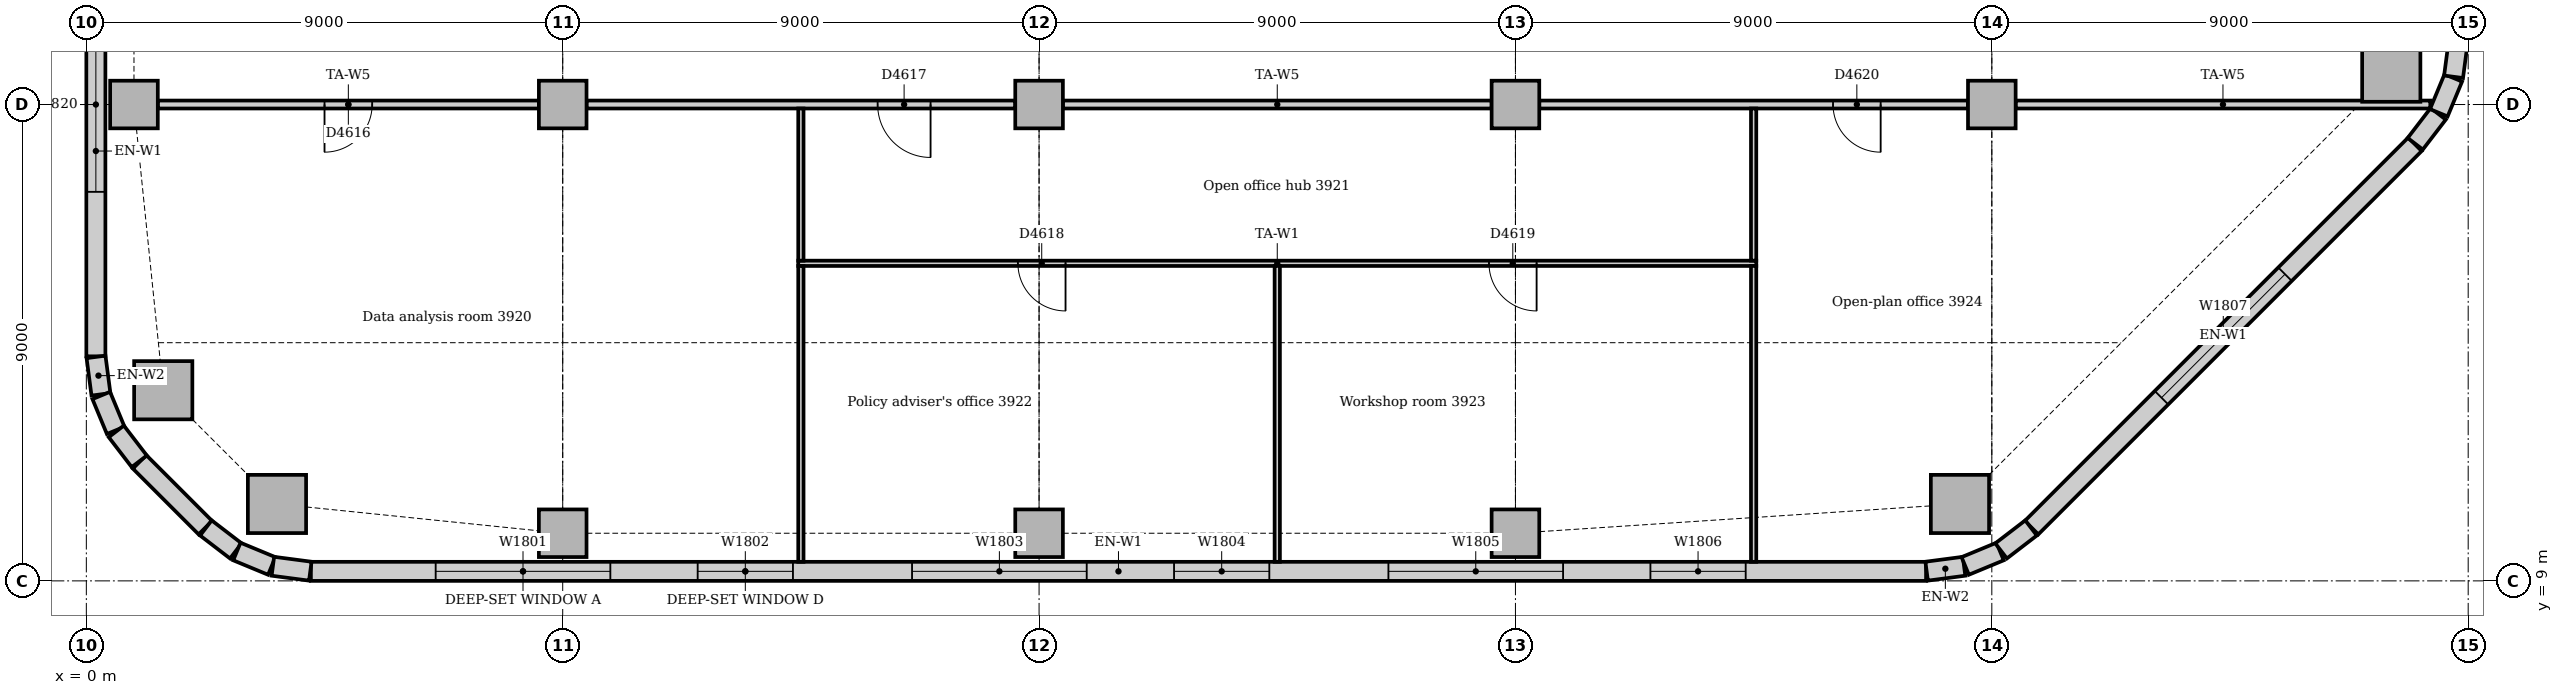
"""IFC4 building model, lengths in metres.
Left out: names, types, materials, properties, quantities, classifications, styles, units other than length and angle.
Written with IfcOpenShell. Run it as: python <this file> out.ifc"""

import sys

from ifc_helpers import new_model, si_unit, direction, frame, frame_2d, origin, origin_2d, place, context, subcontext, project, spatial, rectangle, extrude, element, fill, save


model = new_model("IFC4")
c1 = context("Model", 3, precision=1e-05, world=origin(), true_north=direction((0.0, 1.0)))
c2 = subcontext(c1, "Body", "Model", "MODEL_VIEW")
j1 = project(units=[si_unit("LENGTHUNIT", "METRE"), si_unit("PLANEANGLEUNIT", "RADIAN")], contexts=[c1])
p1 = place(None, origin())
s1 = spatial("IfcSite", under=j1, at=p1, CompositionType="ELEMENT")
p2 = place(p1, origin())
s2 = spatial("IfcBuilding", under=s1, at=p2, CompositionType="ELEMENT")
p3 = place(p2, frame((0.0, 0.0, 165.0)))
s3 = spatial("IfcBuildingStorey", under=s2, at=p3, CompositionType="ELEMENT", Elevation=165.0)
for number, where, z_axis, x_axis in (
    (1, (3.602, 10.453, 0.0), (0.0, 0.0, 1.0), (1.0, 0.0, 0.0)),
    (2, (35.398, 10.453, 0.0), (0.0, 0.0, 1.0), (1.0, 0.0, 0.0)),
    (3, (43.547, 18.602, 0.0), (0.0, 0.0, 1.0), (1.0, 0.0, 0.0)),
    (4, (1.453, 12.602, 0.0), (0.0, 0.0, 1.0), (1.0, 0.0, 0.0)),
):
    element("IfcColumn", number, at=place(p3, frame(where, z_axis=z_axis, x_axis=x_axis)), inside=s3, PredefinedType="COLUMN", context=c2, shape_type="SweptSolid", body=[
        extrude(rectangle(XDim=1.1, YDim=1.1, at=origin_2d()), origin(), (0.0, 0.0, 1.0), 3.85),
    ])
for number, where, z_axis, x_axis in (
    (5, (9.0, 9.9, 0.0), (0.0, 0.0, 1.0), (1.0, 0.0, 0.0)),
    (6, (18.0, 9.9, 0.0), (0.0, 0.0, 1.0), (1.0, 0.0, 0.0)),
    (7, (27.0, 9.9, 0.0), (0.0, 0.0, 1.0), (1.0, 0.0, 0.0)),
    (8, (0.9, 18.0, 0.0), (0.0, 0.0, 1.0), (1.0, 0.0, 0.0)),
    (9, (9.0, 18.0, 0.0), (0.0, 0.0, 1.0), (1.0, 0.0, 0.0)),
    (10, (18.0, 18.0, 0.0), (0.0, 0.0, 1.0), (1.0, 0.0, 0.0)),
    (11, (27.0, 18.0, 0.0), (0.0, 0.0, 1.0), (1.0, 0.0, 0.0)),
    (12, (36.0, 18.0, 0.0), (0.0, 0.0, 1.0), (1.0, 0.0, 0.0)),
):
    element("IfcColumn", number, at=place(p3, frame(where, z_axis=z_axis, x_axis=x_axis)), inside=s3, PredefinedType="COLUMN", context=c2, shape_type="SweptSolid", body=[
        extrude(rectangle(XDim=0.9, YDim=0.9, at=origin_2d()), origin(), (0.0, 0.0, 1.0), 3.85),
    ])
p4 = place(p3, frame((4.243, 9.18, 0.0), z_axis=(0.0, 0.0, 1.0), x_axis=(1.0, 0.0, 0.0)))
e13 = element("IfcWall", 13, at=p4, inside=s3, PredefinedType="STANDARD", context=c2, shape_type="SweptSolid", body=[
    extrude(rectangle(XDim=30.515, YDim=0.36, at=frame_2d((15.257, 0.0))), origin(), (0.0, 0.0, 1.0), 3.85),
])
p5 = place(p4, frame((2.357, 0.0, 0.9)))
e14 = element("IfcOpeningElement", 14, at=p5, cuts=e13, PredefinedType="OPENING", context=c2, shape_type="SweptSolid", body=[
    extrude(rectangle(XDim=3.3, YDim=1.6, at=frame_2d((1.65, 0.8))), frame((0.0, 0.19, 0.0), z_axis=(0.0, -1.0, 0.0), x_axis=(1.0, 0.0, 0.0)), (0.0, 0.0, 1.0), 0.38),
])
p6 = place(p4, frame((7.307, 0.0, 0.9)))
e15 = element("IfcOpeningElement", 15, at=p6, cuts=e13, PredefinedType="OPENING", context=c2, shape_type="SweptSolid", body=[
    extrude(rectangle(XDim=1.8, YDim=1.6, at=frame_2d((0.9, 0.8))), frame((0.0, 0.19, 0.0), z_axis=(0.0, -1.0, 0.0), x_axis=(1.0, 0.0, 0.0)), (0.0, 0.0, 1.0), 0.38),
])
p7 = place(p4, frame((11.357, 0.0, 0.9)))
e16 = element("IfcOpeningElement", 16, at=p7, cuts=e13, PredefinedType="OPENING", context=c2, shape_type="SweptSolid", body=[
    extrude(rectangle(XDim=3.3, YDim=1.6, at=frame_2d((1.65, 0.8))), frame((0.0, 0.19, 0.0), z_axis=(0.0, -1.0, 0.0), x_axis=(1.0, 0.0, 0.0)), (0.0, 0.0, 1.0), 0.38),
])
p8 = place(p4, frame((16.307, 0.0, 0.9)))
e17 = element("IfcOpeningElement", 17, at=p8, cuts=e13, PredefinedType="OPENING", context=c2, shape_type="SweptSolid", body=[
    extrude(rectangle(XDim=1.8, YDim=1.6, at=frame_2d((0.9, 0.8))), frame((0.0, 0.19, 0.0), z_axis=(0.0, -1.0, 0.0), x_axis=(1.0, 0.0, 0.0)), (0.0, 0.0, 1.0), 0.38),
])
p9 = place(p4, frame((20.357, 0.0, 0.9)))
e18 = element("IfcOpeningElement", 18, at=p9, cuts=e13, PredefinedType="OPENING", context=c2, shape_type="SweptSolid", body=[
    extrude(rectangle(XDim=3.3, YDim=1.6, at=frame_2d((1.65, 0.8))), frame((0.0, 0.19, 0.0), z_axis=(0.0, -1.0, 0.0), x_axis=(1.0, 0.0, 0.0)), (0.0, 0.0, 1.0), 0.38),
])
p10 = place(p4, frame((25.307, 0.0, 0.9)))
e19 = element("IfcOpeningElement", 19, at=p10, cuts=e13, PredefinedType="OPENING", context=c2, shape_type="SweptSolid", body=[
    extrude(rectangle(XDim=1.8, YDim=1.6, at=frame_2d((0.9, 0.8))), frame((0.0, 0.19, 0.0), z_axis=(0.0, -1.0, 0.0), x_axis=(1.0, 0.0, 0.0)), (0.0, 0.0, 1.0), 0.38),
])
p11 = place(p3, frame((36.751, 10.006, 0.0), z_axis=(0.0, 0.0, 1.0), x_axis=(0.707106781187, 0.707106781187, 0.0)))
e20 = element("IfcWall", 20, at=p11, inside=s3, PredefinedType="STANDARD", context=c2, shape_type="SweptSolid", body=[
    extrude(rectangle(XDim=10.243, YDim=0.36, at=frame_2d((5.121, 0.0))), origin(), (0.0, 0.0, 1.0), 3.85),
])
p12 = place(p11, frame((3.471, 0.0, 0.9)))
e21 = element("IfcOpeningElement", 21, at=p12, cuts=e20, PredefinedType="OPENING", context=c2, shape_type="SweptSolid", body=[
    extrude(rectangle(XDim=3.3, YDim=1.6, at=frame_2d((1.65, 0.8))), frame((0.0, 0.19, 0.0), z_axis=(0.0, -1.0, 0.0), x_axis=(1.0, 0.0, 0.0)), (0.0, 0.0, 1.0), 0.38),
])
p13 = place(p3, frame((0.18, 21.0, 0.0), z_axis=(0.0, 0.0, 1.0), x_axis=(0.0, -1.0, 0.0)))
e22 = element("IfcWall", 22, at=p13, inside=s3, PredefinedType="STANDARD", context=c2, shape_type="SweptSolid", body=[
    extrude(rectangle(XDim=7.757, YDim=0.36, at=frame_2d((3.879, 0.0))), origin(), (0.0, 0.0, 1.0), 3.85),
])
p14 = place(p13, frame((1.35, 0.0, 0.9)))
e23 = element("IfcOpeningElement", 23, at=p14, cuts=e22, PredefinedType="OPENING", context=c2, shape_type="SweptSolid", body=[
    extrude(rectangle(XDim=3.3, YDim=1.6, at=frame_2d((1.65, 0.8))), frame((0.0, 0.19, 0.0), z_axis=(0.0, -1.0, 0.0), x_axis=(1.0, 0.0, 0.0)), (0.0, 0.0, 1.0), 0.38),
])
p15 = place(p3, frame((1.006, 11.249, 0.0), z_axis=(0.0, 0.0, 1.0), x_axis=(0.707106781187, -0.707106781187, 0.0)))
e24 = element("IfcWall", 24, at=p15, inside=s3, PredefinedType="STANDARD", context=c2, shape_type="SweptSolid", body=[
    extrude(rectangle(XDim=1.757, YDim=0.36, at=frame_2d((0.879, 0.0))), origin(), (0.0, 0.0, 1.0), 3.85),
])
for number, where, z_axis, x_axis in (
    (25, (34.769, 9.183, 0.0), (0.0, 0.0, 1.0), (0.991, 0.131, 0.0)),
    (26, (35.497, 9.282, 0.0), (0.0, 0.0, 1.0), (0.924, 0.383, 0.0)),
):
    element("IfcWall", number, at=place(p3, frame(where, z_axis=z_axis, x_axis=x_axis)), inside=s3, PredefinedType="STANDARD", context=c2, shape_type="SweptSolid", body=[
        extrude(rectangle(XDim=0.713, YDim=0.36, at=frame_2d((0.356, 0.0))), origin(), (0.0, 0.0, 1.0), 3.85),
    ])
for number, where, z_axis, x_axis in (
    (27, (36.175, 9.566, 0.0), (0.0, 0.0, 1.0), (0.793, 0.609, 0.0)),
    (28, (44.0, 17.259, 0.0), (0.0, 0.0, 1.0), (0.609, 0.793, 0.0)),
):
    element("IfcWall", number, at=place(p3, frame(where, z_axis=z_axis, x_axis=x_axis)), inside=s3, PredefinedType="STANDARD", context=c2, shape_type="SweptSolid", body=[
        extrude(rectangle(XDim=0.713, YDim=0.36, at=frame_2d((0.357, 0.0))), origin(), (0.0, 0.0, 1.0), 3.85),
    ])
for number, where, z_axis, x_axis in (
    (29, (44.445, 17.844, 0.0), (0.0, 0.0, 1.0), (0.383, 0.924, 0.0)),
    (30, (44.724, 18.524, 0.0), (0.0, 0.0, 1.0), (0.131, 0.991, 0.0)),
    (31, (0.183, 13.231, 0.0), (0.0, 0.0, 1.0), (0.131, -0.991, 0.0)),
    (32, (0.282, 12.503, 0.0), (0.0, 0.0, 1.0), (0.383, -0.924, 0.0)),
):
    element("IfcWall", number, at=place(p3, frame(where, z_axis=z_axis, x_axis=x_axis)), inside=s3, PredefinedType="STANDARD", context=c2, shape_type="SweptSolid", body=[
        extrude(rectangle(XDim=0.713, YDim=0.36, at=frame_2d((0.356, 0.0))), origin(), (0.0, 0.0, 1.0), 3.85),
    ])
for number, where, z_axis, x_axis in (
    (33, (0.566, 11.825, 0.0), (0.0, 0.0, 1.0), (0.609, -0.793, 0.0)),
    (34, (2.259, 10.0, 0.0), (0.0, 0.0, 1.0), (0.793, -0.609, 0.0)),
):
    element("IfcWall", number, at=place(p3, frame(where, z_axis=z_axis, x_axis=x_axis)), inside=s3, PredefinedType="STANDARD", context=c2, shape_type="SweptSolid", body=[
        extrude(rectangle(XDim=0.713, YDim=0.36, at=frame_2d((0.357, 0.0))), origin(), (0.0, 0.0, 1.0), 3.85),
    ])
for number, where, z_axis, x_axis in (
    (35, (2.844, 9.555, 0.0), (0.0, 0.0, 1.0), (0.924, -0.383, 0.0)),
    (36, (3.524, 9.276, 0.0), (0.0, 0.0, 1.0), (0.991, -0.131, 0.0)),
):
    element("IfcWall", number, at=place(p3, frame(where, z_axis=z_axis, x_axis=x_axis)), inside=s3, PredefinedType="STANDARD", context=c2, shape_type="SweptSolid", body=[
        extrude(rectangle(XDim=0.713, YDim=0.36, at=frame_2d((0.356, 0.0))), origin(), (0.0, 0.0, 1.0), 3.85),
    ])
p16 = place(p3, frame((1.35, 18.0, 0.0), z_axis=(0.0, 0.0, 1.0), x_axis=(1.0, 0.0, 0.0)))
e37 = element("IfcWall", 37, at=p16, inside=s3, PredefinedType="PARTITIONING", context=c2, shape_type="SweptSolid", body=[
    extrude(rectangle(XDim=7.2, YDim=0.15, at=frame_2d((3.6, 0.0))), origin(), (0.0, 0.0, 1.0), 3.262),
])
p17 = place(p16, frame((3.15, 0.0, 0.0)))
e38 = element("IfcOpeningElement", 38, at=p17, cuts=e37, PredefinedType="OPENING", context=c2, shape_type="SweptSolid", body=[
    extrude(rectangle(XDim=0.9, YDim=2.1, at=frame_2d((0.45, 1.05))), frame((0.0, 0.085, 0.0), z_axis=(0.0, -1.0, 0.0), x_axis=(1.0, 0.0, 0.0)), (0.0, 0.0, 1.0), 0.17),
])
p18 = place(p3, frame((9.45, 18.0, 0.0), z_axis=(0.0, 0.0, 1.0), x_axis=(1.0, 0.0, 0.0)))
e39 = element("IfcWall", 39, at=p18, inside=s3, PredefinedType="PARTITIONING", context=c2, shape_type="SweptSolid", body=[
    extrude(rectangle(XDim=8.1, YDim=0.15, at=frame_2d((4.05, 0.0))), origin(), (0.0, 0.0, 1.0), 3.262),
])
p19 = place(p18, frame((5.5, 0.0, 0.0)))
e40 = element("IfcOpeningElement", 40, at=p19, cuts=e39, PredefinedType="OPENING", context=c2, shape_type="SweptSolid", body=[
    extrude(rectangle(XDim=1.0, YDim=2.1, at=frame_2d((0.5, 1.05))), frame((0.0, 0.085, 0.0), z_axis=(0.0, -1.0, 0.0), x_axis=(1.0, 0.0, 0.0)), (0.0, 0.0, 1.0), 0.17),
])
p20 = place(p3, frame((18.45, 18.0, 0.0), z_axis=(0.0, 0.0, 1.0), x_axis=(1.0, 0.0, 0.0)))
e41 = element("IfcWall", 41, at=p20, inside=s3, PredefinedType="PARTITIONING", context=c2, shape_type="SweptSolid", body=[
    extrude(rectangle(XDim=8.1, YDim=0.15, at=frame_2d((4.05, 0.0))), origin(), (0.0, 0.0, 1.0), 3.262),
])
p21 = place(p3, frame((27.45, 18.0, 0.0), z_axis=(0.0, 0.0, 1.0), x_axis=(1.0, 0.0, 0.0)))
e42 = element("IfcWall", 42, at=p21, inside=s3, PredefinedType="PARTITIONING", context=c2, shape_type="SweptSolid", body=[
    extrude(rectangle(XDim=8.1, YDim=0.15, at=frame_2d((4.05, 0.0))), origin(), (0.0, 0.0, 1.0), 3.262),
])
p22 = place(p21, frame((5.55, 0.0, 0.0)))
e43 = element("IfcOpeningElement", 43, at=p22, cuts=e42, PredefinedType="OPENING", context=c2, shape_type="SweptSolid", body=[
    extrude(rectangle(XDim=0.9, YDim=2.1, at=frame_2d((0.45, 1.05))), frame((0.0, 0.085, 0.0), z_axis=(0.0, -1.0, 0.0), x_axis=(1.0, 0.0, 0.0)), (0.0, 0.0, 1.0), 0.17),
])
p23 = place(p3, frame((36.45, 18.0, 0.0), z_axis=(0.0, 0.0, 1.0), x_axis=(1.0, 0.0, 0.0)))
e44 = element("IfcWall", 44, at=p23, inside=s3, PredefinedType="PARTITIONING", context=c2, shape_type="SweptSolid", body=[
    extrude(rectangle(XDim=7.834, YDim=0.15, at=frame_2d((3.917, 0.0))), origin(), (0.0, 0.0, 1.0), 3.35),
])
p24 = place(p3, frame((13.45, 15.0, 0.0), z_axis=(0.0, 0.0, 1.0), x_axis=(1.0, 0.0, 0.0)))
e45 = element("IfcWall", 45, at=p24, inside=s3, PredefinedType="PARTITIONING", context=c2, shape_type="SweptSolid", body=[
    extrude(rectangle(XDim=18.1, YDim=0.1, at=frame_2d((9.05, 0.0))), origin(), (0.0, 0.0, 1.0), 3.85),
])
p25 = place(p24, frame((4.15, 0.0, 0.0)))
e46 = element("IfcOpeningElement", 46, at=p25, cuts=e45, PredefinedType="OPENING", context=c2, shape_type="SweptSolid", body=[
    extrude(rectangle(XDim=0.9, YDim=2.1, at=frame_2d((0.45, 1.05))), frame((0.0, 0.06, 0.0), z_axis=(0.0, -1.0, 0.0), x_axis=(1.0, 0.0, 0.0)), (0.0, 0.0, 1.0), 0.12),
])
p26 = place(p24, frame((13.05, 0.0, 0.0)))
e47 = element("IfcOpeningElement", 47, at=p26, cuts=e45, PredefinedType="OPENING", context=c2, shape_type="SweptSolid", body=[
    extrude(rectangle(XDim=0.9, YDim=2.1, at=frame_2d((0.45, 1.05))), frame((0.0, 0.06, 0.0), z_axis=(0.0, -1.0, 0.0), x_axis=(1.0, 0.0, 0.0)), (0.0, 0.0, 1.0), 0.12),
])
p27 = place(p3, frame((13.5, 15.05, 0.0), z_axis=(0.0, 0.0, 1.0), x_axis=(0.0, 1.0, 0.0)))
e48 = element("IfcWall", 48, at=p27, inside=s3, PredefinedType="PARTITIONING", context=c2, shape_type="SweptSolid", body=[
    extrude(rectangle(XDim=2.875, YDim=0.1, at=frame_2d((1.438, 0.0))), origin(), (0.0, 0.0, 1.0), 3.85),
])
p28 = place(p3, frame((13.5, 9.36, 0.0), z_axis=(0.0, 0.0, 1.0), x_axis=(0.0, 1.0, 0.0)))
e49 = element("IfcWall", 49, at=p28, inside=s3, PredefinedType="PARTITIONING", context=c2, shape_type="SweptSolid", body=[
    extrude(rectangle(XDim=5.59, YDim=0.1, at=frame_2d((2.795, 0.0))), origin(), (0.0, 0.0, 1.0), 3.85),
])
p29 = place(p3, frame((31.5, 15.05, 0.0), z_axis=(0.0, 0.0, 1.0), x_axis=(0.0, 1.0, 0.0)))
e50 = element("IfcWall", 50, at=p29, inside=s3, PredefinedType="PARTITIONING", context=c2, shape_type="SweptSolid", body=[
    extrude(rectangle(XDim=2.875, YDim=0.1, at=frame_2d((1.438, 0.0))), origin(), (0.0, 0.0, 1.0), 3.85),
])
for number, where, z_axis, x_axis in (
    (51, (31.5, 9.36, 0.0), (0.0, 0.0, 1.0), (0.0, 1.0, 0.0)),
    (52, (22.5, 9.36, 0.0), (0.0, 0.0, 1.0), (0.0, 1.0, 0.0)),
):
    element("IfcWall", number, at=place(p3, frame(where, z_axis=z_axis, x_axis=x_axis)), inside=s3, PredefinedType="PARTITIONING", context=c2, shape_type="SweptSolid", body=[
        extrude(rectangle(XDim=5.59, YDim=0.1, at=frame_2d((2.795, 0.0))), origin(), (0.0, 0.0, 1.0), 3.85),
    ])
p30 = place(p5, origin())
e53 = element("IfcWindow", 53, at=p30, inside=s3, PartitioningType="SINGLE_PANEL", PredefinedType="WINDOW", context=c2, shape_type="SweptSolid", body=[
    extrude(rectangle(XDim=3.3, YDim=1.6, at=frame_2d((1.65, 0.8))), frame((0.0, 0.13, 0.0), z_axis=(0.0, -1.0, 0.0), x_axis=(1.0, 0.0, 0.0)), (0.0, 0.0, 1.0), 0.06),
])
fill(e14, e53)
p31 = place(p6, origin())
e54 = element("IfcWindow", 54, at=p31, inside=s3, PartitioningType="SINGLE_PANEL", PredefinedType="WINDOW", context=c2, shape_type="SweptSolid", body=[
    extrude(rectangle(XDim=1.8, YDim=1.6, at=frame_2d((0.9, 0.8))), frame((0.0, 0.13, 0.0), z_axis=(0.0, -1.0, 0.0), x_axis=(1.0, 0.0, 0.0)), (0.0, 0.0, 1.0), 0.06),
])
fill(e15, e54)
p32 = place(p7, origin())
e55 = element("IfcWindow", 55, at=p32, inside=s3, PartitioningType="SINGLE_PANEL", PredefinedType="WINDOW", context=c2, shape_type="SweptSolid", body=[
    extrude(rectangle(XDim=3.3, YDim=1.6, at=frame_2d((1.65, 0.8))), frame((0.0, 0.13, 0.0), z_axis=(0.0, -1.0, 0.0), x_axis=(1.0, 0.0, 0.0)), (0.0, 0.0, 1.0), 0.06),
])
fill(e16, e55)
p33 = place(p8, origin())
e56 = element("IfcWindow", 56, at=p33, inside=s3, PartitioningType="SINGLE_PANEL", PredefinedType="WINDOW", context=c2, shape_type="SweptSolid", body=[
    extrude(rectangle(XDim=1.8, YDim=1.6, at=frame_2d((0.9, 0.8))), frame((0.0, 0.13, 0.0), z_axis=(0.0, -1.0, 0.0), x_axis=(1.0, 0.0, 0.0)), (0.0, 0.0, 1.0), 0.06),
])
fill(e17, e56)
p34 = place(p9, origin())
e57 = element("IfcWindow", 57, at=p34, inside=s3, PartitioningType="SINGLE_PANEL", PredefinedType="WINDOW", context=c2, shape_type="SweptSolid", body=[
    extrude(rectangle(XDim=3.3, YDim=1.6, at=frame_2d((1.65, 0.8))), frame((0.0, 0.13, 0.0), z_axis=(0.0, -1.0, 0.0), x_axis=(1.0, 0.0, 0.0)), (0.0, 0.0, 1.0), 0.06),
])
fill(e18, e57)
p35 = place(p10, origin())
e58 = element("IfcWindow", 58, at=p35, inside=s3, PartitioningType="SINGLE_PANEL", PredefinedType="WINDOW", context=c2, shape_type="SweptSolid", body=[
    extrude(rectangle(XDim=1.8, YDim=1.6, at=frame_2d((0.9, 0.8))), frame((0.0, 0.13, 0.0), z_axis=(0.0, -1.0, 0.0), x_axis=(1.0, 0.0, 0.0)), (0.0, 0.0, 1.0), 0.06),
])
fill(e19, e58)
p36 = place(p12, origin())
e59 = element("IfcWindow", 59, at=p36, inside=s3, PartitioningType="SINGLE_PANEL", PredefinedType="WINDOW", context=c2, shape_type="SweptSolid", body=[
    extrude(rectangle(XDim=3.3, YDim=1.6, at=frame_2d((1.65, 0.8))), frame((0.0, 0.13, 0.0), z_axis=(0.0, -1.0, 0.0), x_axis=(1.0, 0.0, 0.0)), (0.0, 0.0, 1.0), 0.06),
])
fill(e21, e59)
p37 = place(p14, origin())
e60 = element("IfcWindow", 60, at=p37, inside=s3, PartitioningType="SINGLE_PANEL", PredefinedType="WINDOW", context=c2, shape_type="SweptSolid", body=[
    extrude(rectangle(XDim=3.3, YDim=1.6, at=frame_2d((1.65, 0.8))), frame((0.0, 0.13, 0.0), z_axis=(0.0, -1.0, 0.0), x_axis=(1.0, 0.0, 0.0)), (0.0, 0.0, 1.0), 0.06),
])
fill(e23, e60)
p38 = place(p17, frame((0.9, 0.0, 0.0), z_axis=(0.0, 0.0, 1.0), x_axis=(-1.0, 0.0, 0.0)))
e61 = element("IfcDoor", 61, at=p38, inside=s3, OperationType="SINGLE_SWING_RIGHT", PredefinedType="DOOR", context=c2, shape_type="SweptSolid", body=[
    extrude(rectangle(XDim=0.9, YDim=2.1, at=frame_2d((0.45, 1.05))), frame((0.0, 0.025, 0.0), z_axis=(0.0, -1.0, 0.0), x_axis=(1.0, 0.0, 0.0)), (0.0, 0.0, 1.0), 0.05),
])
fill(e38, e61)
p39 = place(p19, frame((1.0, 0.0, 0.0), z_axis=(0.0, 0.0, 1.0), x_axis=(-1.0, 0.0, 0.0)))
e62 = element("IfcDoor", 62, at=p39, inside=s3, OperationType="SINGLE_SWING_LEFT", PredefinedType="DOOR", context=c2, shape_type="SweptSolid", body=[
    extrude(rectangle(XDim=1.0, YDim=2.1, at=frame_2d((0.5, 1.05))), frame((0.0, 0.025, 0.0), z_axis=(0.0, -1.0, 0.0), x_axis=(1.0, 0.0, 0.0)), (0.0, 0.0, 1.0), 0.05),
])
fill(e40, e62)
p40 = place(p25, frame((0.9, 0.0, 0.0), z_axis=(0.0, 0.0, 1.0), x_axis=(-1.0, 0.0, 0.0)))
e63 = element("IfcDoor", 63, at=p40, inside=s3, OperationType="SINGLE_SWING_LEFT", PredefinedType="DOOR", context=c2, shape_type="SweptSolid", body=[
    extrude(rectangle(XDim=0.9, YDim=2.1, at=frame_2d((0.45, 1.05))), frame((0.0, 0.025, 0.0), z_axis=(0.0, -1.0, 0.0), x_axis=(1.0, 0.0, 0.0)), (0.0, 0.0, 1.0), 0.05),
])
fill(e46, e63)
p41 = place(p26, frame((0.9, 0.0, 0.0), z_axis=(0.0, 0.0, 1.0), x_axis=(-1.0, 0.0, 0.0)))
e64 = element("IfcDoor", 64, at=p41, inside=s3, OperationType="SINGLE_SWING_LEFT", PredefinedType="DOOR", context=c2, shape_type="SweptSolid", body=[
    extrude(rectangle(XDim=0.9, YDim=2.1, at=frame_2d((0.45, 1.05))), frame((0.0, 0.025, 0.0), z_axis=(0.0, -1.0, 0.0), x_axis=(1.0, 0.0, 0.0)), (0.0, 0.0, 1.0), 0.05),
])
fill(e47, e64)
p42 = place(p22, frame((0.9, 0.0, 0.0), z_axis=(0.0, 0.0, 1.0), x_axis=(-1.0, 0.0, 0.0)))
e65 = element("IfcDoor", 65, at=p42, inside=s3, OperationType="SINGLE_SWING_LEFT", PredefinedType="DOOR", context=c2, shape_type="SweptSolid", body=[
    extrude(rectangle(XDim=0.9, YDim=2.1, at=frame_2d((0.45, 1.05))), frame((0.0, 0.025, 0.0), z_axis=(0.0, -1.0, 0.0), x_axis=(1.0, 0.0, 0.0)), (0.0, 0.0, 1.0), 0.05),
])
fill(e43, e65)
save(model, sys.argv[1])
